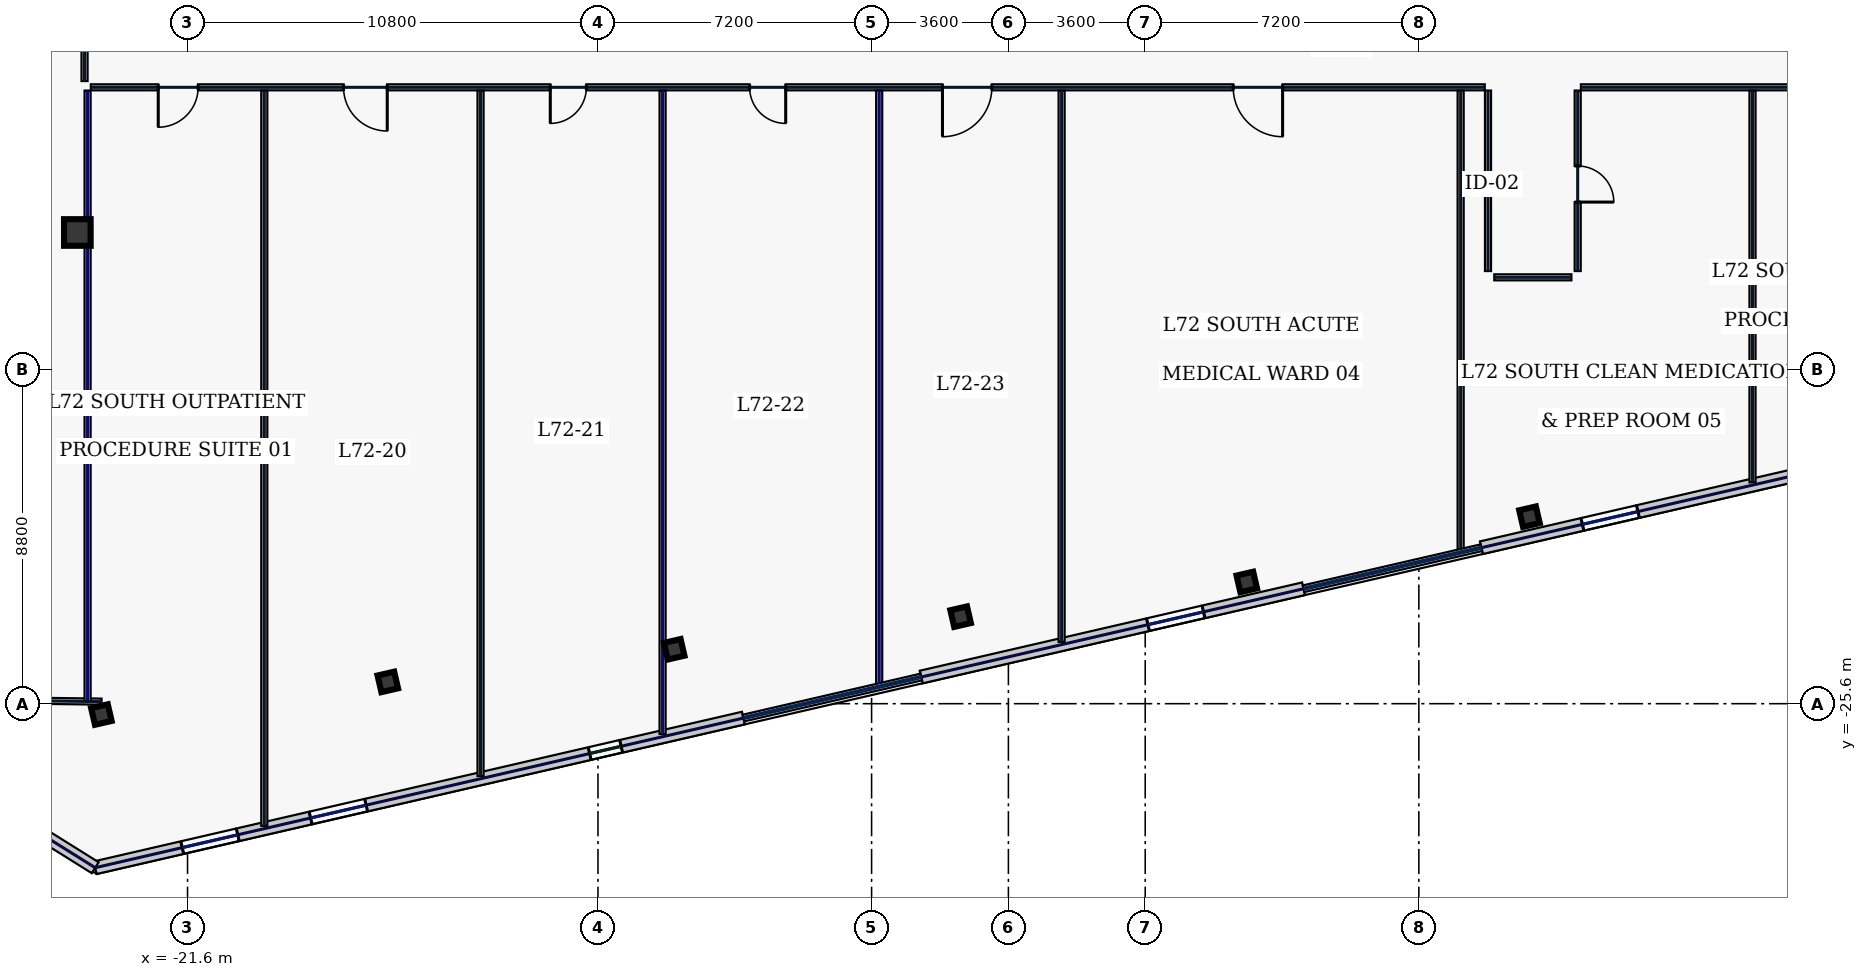
"""IFC4 building model, lengths in metres.
Left out: names, types, materials, properties, quantities, classifications, styles, units other than length and angle.
Written with IfcOpenShell. Run it as: python <this file> out.ifc"""

import sys

from ifc_helpers import new_model, si_unit, direction, frame, frame_2d, origin, origin_2d, place, context, subcontext, project, spatial, rectangle, hollow_rectangle, extrude, element, fill, save


model = new_model("IFC4")
c1 = context("Model", 3, precision=1e-05, world=origin(), true_north=direction((0.0, 1.0)))
c2 = subcontext(c1, "Body", "Model", "MODEL_VIEW")
j1 = project(units=[si_unit("LENGTHUNIT", "METRE"), si_unit("PLANEANGLEUNIT", "RADIAN")], contexts=[c1])
p1 = place(None, origin())
s1 = spatial("IfcSite", under=j1, at=p1, CompositionType="ELEMENT")
p2 = place(p1, origin())
s2 = spatial("IfcBuilding", under=s1, at=p2, CompositionType="ELEMENT")
p3 = place(p2, frame((0.0, 0.0, 309.0)))
s3 = spatial("IfcBuildingStorey", under=s2, at=p3, CompositionType="ELEMENT", Elevation=309.0)
p4 = place(p3, frame((-24.5, -13.2, 0.0), z_axis=(0.0, 0.0, 1.0), x_axis=(1.0, 0.0, 0.0)))
e1 = element("IfcColumn", 1, at=p4, inside=s3, PredefinedType="COLUMN", context=c2, shape_type="SweptSolid", body=[
    extrude(hollow_rectangle(XDim=0.7, YDim=0.7, WallThickness=0.032, at=origin_2d()), origin(), (0.0, 0.0, 1.0), 3.74),
])
for number, where, z_axis, x_axis in (
    (2, (-23.867, -25.886, 0.0), (0.0, 0.0, 1.0), (0.974, 0.225, 0.0)),
    (3, (-16.33, -25.027, 0.0), (0.0, 0.0, 1.0), (0.974, 0.225, 0.0)),
    (4, (-8.794, -24.168, 0.0), (0.0, 0.0, 1.0), (0.974, 0.225, 0.0)),
    (5, (-1.258, -23.31, 0.0), (0.0, 0.0, 1.0), (0.974, 0.225, 0.0)),
    (6, (6.273, -22.397, 0.0), (0.0, 0.0, 1.0), (0.974, 0.225, 0.0)),
    (7, (13.711, -20.68, 0.0), (0.0, 0.0, 1.0), (0.974, 0.225, 0.0)),
):
    element("IfcColumn", number, at=place(p3, frame(where, z_axis=z_axis, x_axis=x_axis)), inside=s3, PredefinedType="COLUMN", context=c2, shape_type="SweptSolid", body=[
        extrude(hollow_rectangle(XDim=0.45, YDim=0.45, WallThickness=0.022, at=origin_2d()), origin(), (0.0, 0.0, 1.0), 3.74),
    ])
p5 = place(p3, frame((-24.03, -29.916, 0.0), z_axis=(0.0, 0.0, 1.0), x_axis=(0.974370978061, 0.224947098473, 0.0)))
e8 = element("IfcWall", 8, at=p5, inside=s3, PredefinedType="STANDARD", context=c2, shape_type="SweptSolid", body=[
    extrude(rectangle(XDim=17.506, YDim=0.34, at=frame_2d((8.753, 0.0))), origin(), (0.0, 0.0, 1.0), 3.74),
])
p6 = place(p5, frame((2.35, 0.0, 0.9)))
e9 = element("IfcOpeningElement", 9, at=p6, cuts=e8, PredefinedType="OPENING", context=c2, shape_type="SweptSolid", body=[
    extrude(rectangle(XDim=1.5, YDim=2.0, at=frame_2d((0.75, 1.0))), frame((0.0, 0.18, 0.0), z_axis=(0.0, -1.0, 0.0), x_axis=(1.0, 0.0, 0.0)), (0.0, 0.0, 1.0), 0.36),
])
p7 = place(p5, frame((5.817, 0.0, 0.9)))
e10 = element("IfcOpeningElement", 10, at=p7, cuts=e8, PredefinedType="OPENING", context=c2, shape_type="SweptSolid", body=[
    extrude(rectangle(XDim=1.5, YDim=2.0, at=frame_2d((0.75, 1.0))), frame((0.0, 0.18, 0.0), z_axis=(0.0, -1.0, 0.0), x_axis=(1.0, 0.0, 0.0)), (0.0, 0.0, 1.0), 0.36),
])
p8 = place(p5, frame((13.353, 0.0, 0.9)))
e11 = element("IfcOpeningElement", 11, at=p8, cuts=e8, PredefinedType="OPENING", context=c2, shape_type="SweptSolid", body=[
    extrude(rectangle(XDim=0.85, YDim=1.85, at=frame_2d((0.425, 0.925))), frame((0.0, 0.18, 0.0), z_axis=(0.0, -1.0, 0.0), x_axis=(1.0, 0.0, 0.0)), (0.0, 0.0, 1.0), 0.36),
])
p9 = place(p3, frame((-2.295, -24.898, 0.0), z_axis=(0.0, 0.0, 1.0), x_axis=(0.974370872906, 0.224947553958, 0.0)))
e12 = element("IfcWall", 12, at=p9, inside=s3, PredefinedType="STANDARD", context=c2, shape_type="SweptSolid", body=[
    extrude(rectangle(XDim=10.328, YDim=0.34, at=frame_2d((5.164, 0.0))), origin(), (0.0, 0.0, 1.0), 3.74),
])
p10 = place(p9, frame((6.124, 0.0, 0.9)))
e13 = element("IfcOpeningElement", 13, at=p10, cuts=e12, PredefinedType="OPENING", context=c2, shape_type="SweptSolid", body=[
    extrude(rectangle(XDim=1.5, YDim=2.0, at=frame_2d((0.75, 1.0))), frame((0.0, 0.18, 0.0), z_axis=(0.0, -1.0, 0.0), x_axis=(1.0, 0.0, 0.0)), (0.0, 0.0, 1.0), 0.36),
])
p11 = place(p3, frame((12.445, -21.495, 0.0), z_axis=(0.0, 0.0, 1.0), x_axis=(0.974369392164, 0.224953967767, 0.0)))
e14 = element("IfcWall", 14, at=p11, inside=s3, PredefinedType="STANDARD", context=c2, shape_type="SweptSolid", body=[
    extrude(rectangle(XDim=17.366, YDim=0.34, at=frame_2d((8.683, 0.0))), origin(), (0.0, 0.0, 1.0), 3.74),
])
p12 = place(p11, frame((2.729, 0.0, 0.9)))
e15 = element("IfcOpeningElement", 15, at=p12, cuts=e14, PredefinedType="OPENING", context=c2, shape_type="SweptSolid", body=[
    extrude(rectangle(XDim=1.5, YDim=2.0, at=frame_2d((0.75, 1.0))), frame((0.0, 0.18, 0.0), z_axis=(0.0, -1.0, 0.0), x_axis=(1.0, 0.0, 0.0)), (0.0, 0.0, 1.0), 0.36),
])
p13 = place(p11, frame((10.363, 0.0, 0.9)))
e16 = element("IfcOpeningElement", 16, at=p13, cuts=e14, PredefinedType="OPENING", context=c2, shape_type="SweptSolid", body=[
    extrude(rectangle(XDim=0.85, YDim=1.85, at=frame_2d((0.425, 0.925))), frame((0.0, 0.18, 0.0), z_axis=(0.0, -1.0, 0.0), x_axis=(1.0, 0.0, 0.0)), (0.0, 0.0, 1.0), 0.36),
])
p14 = place(p11, frame((13.875, 0.0, 0.9)))
e17 = element("IfcOpeningElement", 17, at=p14, cuts=e14, PredefinedType="OPENING", context=c2, shape_type="SweptSolid", body=[
    extrude(rectangle(XDim=1.5, YDim=2.0, at=frame_2d((0.75, 1.0))), frame((0.0, 0.18, 0.0), z_axis=(0.0, -1.0, 0.0), x_axis=(1.0, 0.0, 0.0)), (0.0, 0.0, 1.0), 0.36),
])
p15 = place(p3, frame((-29.343, -26.596, 0.0), z_axis=(0.0, 0.0, 1.0), x_axis=(0.848037708252, -0.529935887993, 0.0)))
e18 = element("IfcWall", 18, at=p15, inside=s3, PredefinedType="STANDARD", context=c2, shape_type="SweptSolid", body=[
    extrude(rectangle(XDim=6.265, YDim=0.34, at=frame_2d((3.133, 0.0))), origin(), (0.0, 0.0, 1.0), 3.74),
])
p16 = place(p3, frame((-28.994, -25.479, 0.0), z_axis=(0.0, 0.0, 1.0), x_axis=(0.999915052546, -0.01303409726, 0.0)))
e19 = element("IfcWall", 19, at=p16, inside=s3, PredefinedType="PARTITIONING", context=c2, shape_type="SweptSolid", body=[
    extrude(rectangle(XDim=5.132, YDim=0.16, at=frame_2d((2.566, 0.0))), origin(), (0.0, 0.0, 1.0), 3.74),
])
p17 = place(p3, frame((-24.31, -9.215, 0.0), z_axis=(0.0, 0.0, 1.0), x_axis=(0.0, 1.0, 0.0)))
e20 = element("IfcWall", 20, at=p17, inside=s3, PredefinedType="PARTITIONING", context=c2, shape_type="SweptSolid", body=[
    extrude(rectangle(XDim=18.63, YDim=0.16, at=frame_2d((9.315, 0.0))), origin(), (0.0, 0.0, 1.0), 3.74),
])
p18 = place(p17, frame((1.769, 0.0, 0.0)))
e21 = element("IfcOpeningElement", 21, at=p18, cuts=e20, PredefinedType="OPENING", context=c2, shape_type="SweptSolid", body=[
    extrude(rectangle(XDim=0.95, YDim=2.2, at=frame_2d((0.475, 1.1))), frame((0.0, 0.09, 0.0), z_axis=(0.0, -1.0, 0.0), x_axis=(1.0, 0.0, 0.0)), (0.0, 0.0, 1.0), 0.18),
])
p19 = place(p17, frame((6.85, 0.0, 0.0)))
e22 = element("IfcOpeningElement", 22, at=p19, cuts=e20, PredefinedType="OPENING", context=c2, shape_type="SweptSolid", body=[
    extrude(rectangle(XDim=0.95, YDim=2.2, at=frame_2d((0.475, 1.1))), frame((0.0, 0.09, 0.0), z_axis=(0.0, -1.0, 0.0), x_axis=(1.0, 0.0, 0.0)), (0.0, 0.0, 1.0), 0.18),
])
p20 = place(p17, frame((12.05, 0.0, 0.0)))
e23 = element("IfcOpeningElement", 23, at=p20, cuts=e20, PredefinedType="OPENING", context=c2, shape_type="SweptSolid", body=[
    extrude(rectangle(XDim=0.95, YDim=2.2, at=frame_2d((0.475, 1.1))), frame((0.0, 0.09, 0.0), z_axis=(0.0, -1.0, 0.0), x_axis=(1.0, 0.0, 0.0)), (0.0, 0.0, 1.0), 0.18),
])
p21 = place(p17, frame((15.981, 0.0, 0.0)))
e24 = element("IfcOpeningElement", 24, at=p21, cuts=e20, PredefinedType="OPENING", context=c2, shape_type="SweptSolid", body=[
    extrude(rectangle(XDim=0.95, YDim=2.2, at=frame_2d((0.475, 1.1))), frame((0.0, 0.09, 0.0), z_axis=(0.0, -1.0, 0.0), x_axis=(1.0, 0.0, 0.0)), (0.0, 0.0, 1.0), 0.18),
])
p22 = place(p3, frame((24.145, -9.38, 0.0), z_axis=(0.0, 0.0, 1.0), x_axis=(-1.0, 0.0, 0.0)))
e25 = element("IfcWall", 25, at=p22, inside=s3, PredefinedType="PARTITIONING", context=c2, shape_type="SweptSolid", body=[
    extrude(rectangle(XDim=9.08, YDim=0.16, at=frame_2d((4.54, 0.0))), origin(), (0.0, 0.0, 1.0), 3.74),
])
p23 = place(p22, frame((2.044, 0.0, 0.0)))
e26 = element("IfcOpeningElement", 26, at=p23, cuts=e25, PredefinedType="OPENING", context=c2, shape_type="SweptSolid", body=[
    extrude(rectangle(XDim=0.95, YDim=2.2, at=frame_2d((0.475, 1.1))), frame((0.0, 0.09, 0.0), z_axis=(0.0, -1.0, 0.0), x_axis=(1.0, 0.0, 0.0)), (0.0, 0.0, 1.0), 0.18),
])
p24 = place(p3, frame((14.98, -9.465, 0.0), z_axis=(0.0, 0.0, 1.0), x_axis=(0.0, -1.0, 0.0)))
e27 = element("IfcWall", 27, at=p24, inside=s3, PredefinedType="PARTITIONING", context=c2, shape_type="SweptSolid", body=[
    extrude(rectangle(XDim=4.75, YDim=0.16, at=frame_2d((2.375, 0.0))), origin(), (0.0, 0.0, 1.0), 3.74),
])
p25 = place(p24, frame((1.985, 0.0, 0.0)))
e28 = element("IfcOpeningElement", 28, at=p25, cuts=e27, PredefinedType="OPENING", context=c2, shape_type="SweptSolid", body=[
    extrude(rectangle(XDim=0.95, YDim=2.2, at=frame_2d((0.475, 1.1))), frame((0.0, 0.09, 0.0), z_axis=(0.0, -1.0, 0.0), x_axis=(1.0, 0.0, 0.0)), (0.0, 0.0, 1.0), 0.18),
])
p26 = place(p3, frame((14.815, -14.38, 0.0), z_axis=(0.0, 0.0, 1.0), x_axis=(-1.0, 0.0, 0.0)))
e29 = element("IfcWall", 29, at=p26, inside=s3, PredefinedType="PARTITIONING", context=c2, shape_type="SweptSolid", body=[
    extrude(rectangle(XDim=2.03, YDim=0.16, at=frame_2d((1.015, 0.0))), origin(), (0.0, 0.0, 1.0), 3.74),
])
p27 = place(p3, frame((12.62, -14.215, 0.0), z_axis=(0.0, 0.0, 1.0), x_axis=(0.0, 1.0, 0.0)))
e30 = element("IfcWall", 30, at=p27, inside=s3, PredefinedType="PARTITIONING", context=c2, shape_type="SweptSolid", body=[
    extrude(rectangle(XDim=4.75, YDim=0.16, at=frame_2d((2.375, 0.0))), origin(), (0.0, 0.0, 1.0), 3.74),
])
p28 = place(p3, frame((12.535, -9.38, 0.0), z_axis=(0.0, 0.0, 1.0), x_axis=(-1.0, 0.0, 0.0)))
e31 = element("IfcWall", 31, at=p28, inside=s3, PredefinedType="PARTITIONING", context=c2, shape_type="SweptSolid", body=[
    extrude(rectangle(XDim=36.68, YDim=0.16, at=frame_2d((18.34, 0.0))), origin(), (0.0, 0.0, 1.0), 3.74),
])
p29 = place(p28, frame((33.856, 0.0, 0.0)))
e32 = element("IfcOpeningElement", 32, at=p29, cuts=e31, PredefinedType="OPENING", context=c2, shape_type="SweptSolid", body=[
    extrude(rectangle(XDim=1.05, YDim=2.2, at=frame_2d((0.525, 1.1))), frame((0.0, 0.09, 0.0), z_axis=(0.0, -1.0, 0.0), x_axis=(1.0, 0.0, 0.0)), (0.0, 0.0, 1.0), 0.18),
])
p30 = place(p28, frame((28.88, 0.0, 0.0)))
e33 = element("IfcOpeningElement", 33, at=p30, cuts=e31, PredefinedType="OPENING", context=c2, shape_type="SweptSolid", body=[
    extrude(rectangle(XDim=1.15, YDim=2.2, at=frame_2d((0.575, 1.1))), frame((0.0, 0.09, 0.0), z_axis=(0.0, -1.0, 0.0), x_axis=(1.0, 0.0, 0.0)), (0.0, 0.0, 1.0), 0.18),
])
p31 = place(p28, frame((23.64, 0.0, 0.0)))
e34 = element("IfcOpeningElement", 34, at=p31, cuts=e31, PredefinedType="OPENING", context=c2, shape_type="SweptSolid", body=[
    extrude(rectangle(XDim=0.95, YDim=2.2, at=frame_2d((0.475, 1.1))), frame((0.0, 0.09, 0.0), z_axis=(0.0, -1.0, 0.0), x_axis=(1.0, 0.0, 0.0)), (0.0, 0.0, 1.0), 0.18),
])
p32 = place(p28, frame((18.395, 0.0, 0.0)))
e35 = element("IfcOpeningElement", 35, at=p32, cuts=e31, PredefinedType="OPENING", context=c2, shape_type="SweptSolid", body=[
    extrude(rectangle(XDim=0.95, YDim=2.2, at=frame_2d((0.475, 1.1))), frame((0.0, 0.09, 0.0), z_axis=(0.0, -1.0, 0.0), x_axis=(1.0, 0.0, 0.0)), (0.0, 0.0, 1.0), 0.18),
])
p33 = place(p28, frame((12.97, 0.0, 0.0)))
e36 = element("IfcOpeningElement", 36, at=p33, cuts=e31, PredefinedType="OPENING", context=c2, shape_type="SweptSolid", body=[
    extrude(rectangle(XDim=1.3, YDim=2.2, at=frame_2d((0.65, 1.1))), frame((0.0, 0.09, 0.0), z_axis=(0.0, -1.0, 0.0), x_axis=(1.0, 0.0, 0.0)), (0.0, 0.0, 1.0), 0.18),
])
p34 = place(p28, frame((5.32, 0.0, 0.0)))
e37 = element("IfcOpeningElement", 37, at=p34, cuts=e31, PredefinedType="OPENING", context=c2, shape_type="SweptSolid", body=[
    extrude(rectangle(XDim=1.3, YDim=2.2, at=frame_2d((0.65, 1.1))), frame((0.0, 0.09, 0.0), z_axis=(0.0, -1.0, 0.0), x_axis=(1.0, 0.0, 0.0)), (0.0, 0.0, 1.0), 0.18),
])
p35 = place(p3, frame((-24.23, -25.536, 0.0), z_axis=(0.0, 0.0, 1.0), x_axis=(0.0, 1.0, 0.0)))
e38 = element("IfcWall", 38, at=p35, inside=s3, PredefinedType="PARTITIONING", context=c2, shape_type="SweptSolid", body=[
    extrude(rectangle(XDim=16.071, YDim=0.16, at=frame_2d((8.035, 0.0))), origin(), (0.0, 0.0, 1.0), 3.335),
])
p36 = place(p3, frame((-19.58, -28.817, 0.0), z_axis=(0.0, 0.0, 1.0), x_axis=(0.0, 1.0, 0.0)))
e39 = element("IfcWall", 39, at=p36, inside=s3, PredefinedType="PARTITIONING", context=c2, shape_type="SweptSolid", body=[
    extrude(rectangle(XDim=19.352, YDim=0.16, at=frame_2d((9.676, 0.0))), origin(), (0.0, 0.0, 1.0), 3.74),
])
p37 = place(p3, frame((-9.1, -26.398, 0.0), z_axis=(0.0, 0.0, 1.0), x_axis=(0.0, 1.0, 0.0)))
e40 = element("IfcWall", 40, at=p37, inside=s3, PredefinedType="PARTITIONING", context=c2, shape_type="SweptSolid", body=[
    extrude(rectangle(XDim=16.933, YDim=0.16, at=frame_2d((8.466, 0.0))), origin(), (0.0, 0.0, 1.0), 3.335),
])
p38 = place(p3, frame((1.4, -23.973, 0.0), z_axis=(0.0, 0.0, 1.0), x_axis=(0.0, 1.0, 0.0)))
e41 = element("IfcWall", 41, at=p38, inside=s3, PredefinedType="PARTITIONING", context=c2, shape_type="SweptSolid", body=[
    extrude(rectangle(XDim=14.508, YDim=0.16, at=frame_2d((7.254, 0.0))), origin(), (0.0, 0.0, 1.0), 3.74),
])
p39 = place(p3, frame((11.9, -21.549, 0.0), z_axis=(0.0, 0.0, 1.0), x_axis=(0.0, 1.0, 0.0)))
e42 = element("IfcWall", 42, at=p39, inside=s3, PredefinedType="PARTITIONING", context=c2, shape_type="SweptSolid", body=[
    extrude(rectangle(XDim=12.084, YDim=0.16, at=frame_2d((6.042, 0.0))), origin(), (0.0, 0.0, 1.0), 3.74),
])
p40 = place(p3, frame((19.58, -19.776, 0.0), z_axis=(0.0, 0.0, 1.0), x_axis=(0.0, 1.0, 0.0)))
e43 = element("IfcWall", 43, at=p40, inside=s3, PredefinedType="PARTITIONING", context=c2, shape_type="SweptSolid", body=[
    extrude(rectangle(XDim=10.311, YDim=0.16, at=frame_2d((5.156, 0.0))), origin(), (0.0, 0.0, 1.0), 3.74),
])
p41 = place(p3, frame((-13.89, -27.503, 0.0), z_axis=(0.0, 0.0, 1.0), x_axis=(0.0, 1.0, 0.0)))
e44 = element("IfcWall", 44, at=p41, inside=s3, PredefinedType="PARTITIONING", context=c2, shape_type="SweptSolid", body=[
    extrude(rectangle(XDim=18.038, YDim=0.16, at=frame_2d((9.019, 0.0))), origin(), (0.0, 0.0, 1.0), 3.74),
])
p42 = place(p3, frame((-3.4, -25.082, 0.0), z_axis=(0.0, 0.0, 1.0), x_axis=(0.0, 1.0, 0.0)))
e45 = element("IfcWall", 45, at=p42, inside=s3, PredefinedType="PARTITIONING", context=c2, shape_type="SweptSolid", body=[
    extrude(rectangle(XDim=15.617, YDim=0.16, at=frame_2d((7.808, 0.0))), origin(), (0.0, 0.0, 1.0), 3.335),
])
p43 = place(p6, origin())
e46 = element("IfcWindow", 46, at=p43, inside=s3, PartitioningType="SINGLE_PANEL", PredefinedType="WINDOW", context=c2, shape_type="SweptSolid", body=[
    extrude(rectangle(XDim=1.5, YDim=2.0, at=frame_2d((0.75, 1.0))), frame((0.0, 0.03, 0.0), z_axis=(0.0, -1.0, 0.0), x_axis=(1.0, 0.0, 0.0)), (0.0, 0.0, 1.0), 0.06),
])
fill(e9, e46)
p44 = place(p7, origin())
e47 = element("IfcWindow", 47, at=p44, inside=s3, PartitioningType="SINGLE_PANEL", PredefinedType="WINDOW", context=c2, shape_type="SweptSolid", body=[
    extrude(rectangle(XDim=1.5, YDim=2.0, at=frame_2d((0.75, 1.0))), frame((0.0, 0.03, 0.0), z_axis=(0.0, -1.0, 0.0), x_axis=(1.0, 0.0, 0.0)), (0.0, 0.0, 1.0), 0.06),
])
fill(e10, e47)
p45 = place(p8, origin())
e48 = element("IfcWindow", 48, at=p45, inside=s3, PartitioningType="SINGLE_PANEL", PredefinedType="WINDOW", context=c2, shape_type="SweptSolid", body=[
    extrude(rectangle(XDim=0.85, YDim=1.85, at=frame_2d((0.425, 0.925))), frame((0.0, 0.03, 0.0), z_axis=(0.0, -1.0, 0.0), x_axis=(1.0, 0.0, 0.0)), (0.0, 0.0, 1.0), 0.06),
])
fill(e11, e48)
p46 = place(p10, origin())
e49 = element("IfcWindow", 49, at=p46, inside=s3, PartitioningType="SINGLE_PANEL", PredefinedType="WINDOW", context=c2, shape_type="SweptSolid", body=[
    extrude(rectangle(XDim=1.5, YDim=2.0, at=frame_2d((0.75, 1.0))), frame((0.0, 0.03, 0.0), z_axis=(0.0, -1.0, 0.0), x_axis=(1.0, 0.0, 0.0)), (0.0, 0.0, 1.0), 0.06),
])
fill(e13, e49)
p47 = place(p12, origin())
e50 = element("IfcWindow", 50, at=p47, inside=s3, PartitioningType="SINGLE_PANEL", PredefinedType="WINDOW", context=c2, shape_type="SweptSolid", body=[
    extrude(rectangle(XDim=1.5, YDim=2.0, at=frame_2d((0.75, 1.0))), frame((0.0, 0.03, 0.0), z_axis=(0.0, -1.0, 0.0), x_axis=(1.0, 0.0, 0.0)), (0.0, 0.0, 1.0), 0.06),
])
fill(e15, e50)
p48 = place(p29, origin())
e51 = element("IfcDoor", 51, at=p48, inside=s3, OperationType="SINGLE_SWING_RIGHT", PredefinedType="DOOR", context=c2, shape_type="SweptSolid", body=[
    extrude(rectangle(XDim=1.05, YDim=2.2, at=frame_2d((0.525, 1.1))), frame((0.0, 0.025, 0.0), z_axis=(0.0, -1.0, 0.0), x_axis=(1.0, 0.0, 0.0)), (0.0, 0.0, 1.0), 0.05),
])
fill(e32, e51)
p49 = place(p30, origin())
e52 = element("IfcDoor", 52, at=p49, inside=s3, OperationType="SINGLE_SWING_LEFT", PredefinedType="DOOR", context=c2, shape_type="SweptSolid", body=[
    extrude(rectangle(XDim=1.15, YDim=2.2, at=frame_2d((0.575, 1.1))), frame((0.0, 0.025, 0.0), z_axis=(0.0, -1.0, 0.0), x_axis=(1.0, 0.0, 0.0)), (0.0, 0.0, 1.0), 0.05),
])
fill(e33, e52)
p50 = place(p31, origin())
e53 = element("IfcDoor", 53, at=p50, inside=s3, OperationType="SINGLE_SWING_RIGHT", PredefinedType="DOOR", context=c2, shape_type="SweptSolid", body=[
    extrude(rectangle(XDim=0.95, YDim=2.2, at=frame_2d((0.475, 1.1))), frame((0.0, 0.025, 0.0), z_axis=(0.0, -1.0, 0.0), x_axis=(1.0, 0.0, 0.0)), (0.0, 0.0, 1.0), 0.05),
])
fill(e34, e53)
p51 = place(p32, origin())
e54 = element("IfcDoor", 54, at=p51, inside=s3, OperationType="SINGLE_SWING_LEFT", PredefinedType="DOOR", context=c2, shape_type="SweptSolid", body=[
    extrude(rectangle(XDim=0.95, YDim=2.2, at=frame_2d((0.475, 1.1))), frame((0.0, 0.025, 0.0), z_axis=(0.0, -1.0, 0.0), x_axis=(1.0, 0.0, 0.0)), (0.0, 0.0, 1.0), 0.05),
])
fill(e35, e54)
p52 = place(p33, origin())
e55 = element("IfcDoor", 55, at=p52, inside=s3, OperationType="SINGLE_SWING_RIGHT", PredefinedType="DOOR", context=c2, shape_type="SweptSolid", body=[
    extrude(rectangle(XDim=1.3, YDim=2.2, at=frame_2d((0.65, 1.1))), frame((0.0, 0.025, 0.0), z_axis=(0.0, -1.0, 0.0), x_axis=(1.0, 0.0, 0.0)), (0.0, 0.0, 1.0), 0.05),
])
fill(e36, e55)
p53 = place(p34, origin())
e56 = element("IfcDoor", 56, at=p53, inside=s3, OperationType="SINGLE_SWING_LEFT", PredefinedType="DOOR", context=c2, shape_type="SweptSolid", body=[
    extrude(rectangle(XDim=1.3, YDim=2.2, at=frame_2d((0.65, 1.1))), frame((0.0, 0.025, 0.0), z_axis=(0.0, -1.0, 0.0), x_axis=(1.0, 0.0, 0.0)), (0.0, 0.0, 1.0), 0.05),
])
fill(e37, e56)
p54 = place(p25, origin())
e57 = element("IfcDoor", 57, at=p54, inside=s3, OperationType="SINGLE_SWING_RIGHT", PredefinedType="DOOR", context=c2, shape_type="SweptSolid", body=[
    extrude(rectangle(XDim=0.95, YDim=2.2, at=frame_2d((0.475, 1.1))), frame((0.0, 0.025, 0.0), z_axis=(0.0, -1.0, 0.0), x_axis=(1.0, 0.0, 0.0)), (0.0, 0.0, 1.0), 0.05),
])
fill(e28, e57)
save(model, sys.argv[1])
